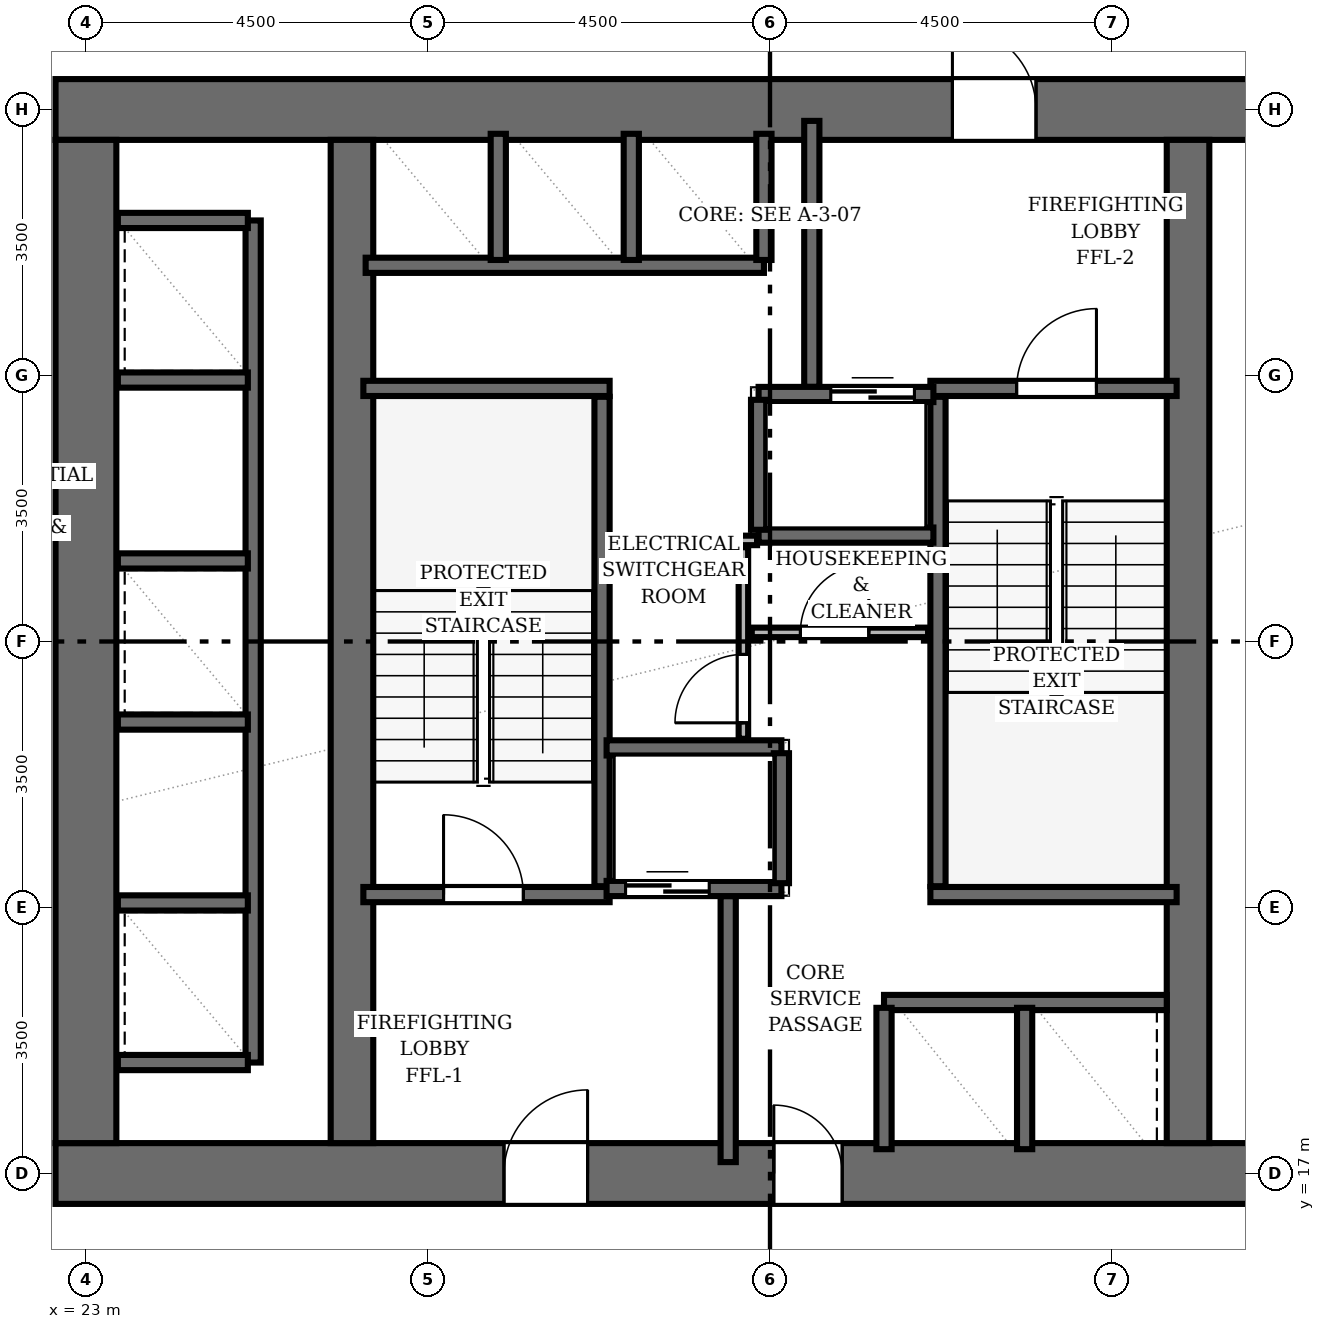
"""IFC4 building model, lengths in metres.
Left out: names, types, materials, properties, quantities, classifications, styles, units other than length and angle.
Written with IfcOpenShell. Run it as: python <this file> out.ifc"""

import sys

from ifc_helpers import new_model, si_unit, direction, frame, frame_2d, origin, place, context, subcontext, project, spatial, rectangle, extrude, element, fill, save


model = new_model("IFC4")
c1 = context("Model", 3, precision=1e-05, world=origin(), true_north=direction((0.0, 1.0)))
c2 = subcontext(c1, "Body", "Model", "MODEL_VIEW")
j1 = project(units=[si_unit("LENGTHUNIT", "METRE"), si_unit("PLANEANGLEUNIT", "RADIAN")], contexts=[c1])
p1 = place(None, origin())
s1 = spatial("IfcSite", under=j1, at=p1, CompositionType="ELEMENT")
p2 = place(p1, origin())
s2 = spatial("IfcBuilding", under=s1, at=p2, CompositionType="ELEMENT")
p3 = place(p2, frame((0.0, 0.0, 24.8)))
s3 = spatial("IfcBuildingStorey", under=s2, at=p3, CompositionType="ELEMENT", Elevation=24.8)
p4 = place(p3, frame((22.6, 17.0, 0.0), z_axis=(0.0, 0.0, 1.0), x_axis=(1.0, 0.0, 0.0)))
e1 = element("IfcWall", 1, at=p4, inside=s3, PredefinedType="SHEAR", context=c2, shape_type="SweptSolid", body=[
    extrude(rectangle(XDim=18.8, YDim=0.8, at=frame_2d((9.4, 0.0))), origin(), (0.0, 0.0, 1.0), 3.2),
])
p5 = place(p4, frame((5.9, 0.0, 0.0)))
e2 = element("IfcOpeningElement", 2, at=p5, cuts=e1, PredefinedType="OPENING", context=c2, shape_type="SweptSolid", body=[
    extrude(rectangle(XDim=1.1, YDim=2.15, at=frame_2d((0.55, 1.075))), frame((0.0, 0.41, 0.0), z_axis=(0.0, -1.0, 0.0), x_axis=(1.0, 0.0, 0.0)), (0.0, 0.0, 1.0), 0.82),
])
p6 = place(p4, frame((9.45, 0.0, 0.0)))
e3 = element("IfcOpeningElement", 3, at=p6, cuts=e1, PredefinedType="OPENING", context=c2, shape_type="SweptSolid", body=[
    extrude(rectangle(XDim=0.9, YDim=2.1, at=frame_2d((0.45, 1.05))), frame((0.0, 0.41, 0.0), z_axis=(0.0, -1.0, 0.0), x_axis=(1.0, 0.0, 0.0)), (0.0, 0.0, 1.0), 0.82),
])
p7 = place(p3, frame((22.6, 31.0, 0.0), z_axis=(0.0, 0.0, 1.0), x_axis=(1.0, 0.0, 0.0)))
e4 = element("IfcWall", 4, at=p7, inside=s3, PredefinedType="SHEAR", context=c2, shape_type="SweptSolid", body=[
    extrude(rectangle(XDim=18.8, YDim=0.8, at=frame_2d((9.4, 0.0))), origin(), (0.0, 0.0, 1.0), 3.2),
])
p8 = place(p7, frame((11.8, 0.0, 0.0)))
e5 = element("IfcOpeningElement", 5, at=p8, cuts=e4, PredefinedType="OPENING", context=c2, shape_type="SweptSolid", body=[
    extrude(rectangle(XDim=1.1, YDim=2.15, at=frame_2d((0.55, 1.075))), frame((0.0, 0.41, 0.0), z_axis=(0.0, -1.0, 0.0), x_axis=(1.0, 0.0, 0.0)), (0.0, 0.0, 1.0), 0.82),
])
p9 = place(p3, frame((23.0, 17.4, 0.0), z_axis=(0.0, 0.0, 1.0), x_axis=(0.0, 1.0, 0.0)))
e6 = element("IfcWall", 6, at=p9, inside=s3, PredefinedType="SHEAR", context=c2, shape_type="SweptSolid", body=[
    extrude(rectangle(XDim=13.2, YDim=0.8, at=frame_2d((6.6, 0.0))), origin(), (0.0, 0.0, 1.0), 3.2),
])
for number, where, z_axis, x_axis in (
    (7, (26.5, 17.4, 0.0), (0.0, 0.0, 1.0), (0.0, 1.0, 0.0)),
    (8, (37.5, 17.4, 0.0), (0.0, 0.0, 1.0), (0.0, 1.0, 0.0)),
):
    element("IfcWall", number, at=place(p3, frame(where, z_axis=z_axis, x_axis=x_axis)), inside=s3, PredefinedType="SHEAR", context=c2, shape_type="SweptSolid", body=[
        extrude(rectangle(XDim=13.2, YDim=0.56, at=frame_2d((6.6, 0.0))), origin(), (0.0, 0.0, 1.0), 3.2),
    ])
p10 = place(p3, frame((29.79, 20.78, 0.0), z_axis=(0.0, 0.0, 1.0), x_axis=(0.0, 1.0, 0.0)))
e9 = element("IfcWall", 9, at=p10, inside=s3, PredefinedType="SHEAR", context=c2, shape_type="SweptSolid", body=[
    extrude(rectangle(XDim=6.44, YDim=0.2, at=frame_2d((3.22, 0.0))), origin(), (0.0, 0.0, 1.0), 3.2),
])
p11 = place(p3, frame((26.65, 27.33, 0.0), z_axis=(0.0, 0.0, 1.0), x_axis=(1.0, 0.0, 0.0)))
e10 = element("IfcWall", 10, at=p11, inside=s3, PredefinedType="SHEAR", context=c2, shape_type="SweptSolid", body=[
    extrude(rectangle(XDim=3.24, YDim=0.2, at=frame_2d((1.62, 0.0))), origin(), (0.0, 0.0, 1.0), 3.2),
])
p12 = place(p3, frame((26.65, 20.67, 0.0), z_axis=(0.0, 0.0, 1.0), x_axis=(1.0, 0.0, 0.0)))
e11 = element("IfcWall", 11, at=p12, inside=s3, PredefinedType="SHEAR", context=c2, shape_type="SweptSolid", body=[
    extrude(rectangle(XDim=3.24, YDim=0.2, at=frame_2d((1.62, 0.0))), origin(), (0.0, 0.0, 1.0), 3.2),
])
p13 = place(p12, frame((1.055, 0.0, 0.0)))
e12 = element("IfcOpeningElement", 12, at=p13, cuts=e11, PredefinedType="OPENING", context=c2, shape_type="SweptSolid", body=[
    extrude(rectangle(XDim=1.05, YDim=2.15, at=frame_2d((0.525, 1.075))), frame((0.0, 0.11, 0.0), z_axis=(0.0, -1.0, 0.0), x_axis=(1.0, 0.0, 0.0)), (0.0, 0.0, 1.0), 0.22),
])
p14 = place(p3, frame((34.21, 20.78, 0.0), z_axis=(0.0, 0.0, 1.0), x_axis=(0.0, 1.0, 0.0)))
e13 = element("IfcWall", 13, at=p14, inside=s3, PredefinedType="SHEAR", context=c2, shape_type="SweptSolid", body=[
    extrude(rectangle(XDim=6.44, YDim=0.2, at=frame_2d((3.22, 0.0))), origin(), (0.0, 0.0, 1.0), 3.2),
])
p15 = place(p3, frame((34.11, 20.67, 0.0), z_axis=(0.0, 0.0, 1.0), x_axis=(1.0, 0.0, 0.0)))
e14 = element("IfcWall", 14, at=p15, inside=s3, PredefinedType="SHEAR", context=c2, shape_type="SweptSolid", body=[
    extrude(rectangle(XDim=3.24, YDim=0.2, at=frame_2d((1.62, 0.0))), origin(), (0.0, 0.0, 1.0), 3.2),
])
p16 = place(p3, frame((34.11, 27.33, 0.0), z_axis=(0.0, 0.0, 1.0), x_axis=(1.0, 0.0, 0.0)))
e15 = element("IfcWall", 15, at=p16, inside=s3, PredefinedType="SHEAR", context=c2, shape_type="SweptSolid", body=[
    extrude(rectangle(XDim=3.24, YDim=0.2, at=frame_2d((1.62, 0.0))), origin(), (0.0, 0.0, 1.0), 3.2),
])
p17 = place(p16, frame((1.135, 0.0, 0.0)))
e16 = element("IfcOpeningElement", 16, at=p17, cuts=e15, PredefinedType="OPENING", context=c2, shape_type="SweptSolid", body=[
    extrude(rectangle(XDim=1.05, YDim=2.15, at=frame_2d((0.525, 1.075))), frame((0.0, 0.11, 0.0), z_axis=(0.0, -1.0, 0.0), x_axis=(1.0, 0.0, 0.0)), (0.0, 0.0, 1.0), 0.22),
])
for number, where, z_axis, x_axis in (
    (17, (31.45, 17.15, 0.0), (0.0, 0.0, 1.0), (0.0, 1.0, 0.0)),
    (18, (32.55, 27.35, 0.0), (0.0, 0.0, 1.0), (0.0, 1.0, 0.0)),
):
    element("IfcWall", number, at=place(p3, frame(where, z_axis=z_axis, x_axis=x_axis)), inside=s3, PredefinedType="SHEAR", context=c2, shape_type="SweptSolid", body=[
        extrude(rectangle(XDim=3.5, YDim=0.2, at=frame_2d((1.75, 0.0))), origin(), (0.0, 0.0, 1.0), 3.2),
    ])
p18 = place(p3, frame((29.85, 20.75, 0.0), z_axis=(0.0, 0.0, 1.0), x_axis=(1.0, 0.0, 0.0)))
e19 = element("IfcWall", 19, at=p18, inside=s3, PredefinedType="SHEAR", context=c2, shape_type="SweptSolid", body=[
    extrude(rectangle(XDim=2.3, YDim=0.2, at=frame_2d((1.15, 0.0))), origin(), (0.0, 0.0, 1.0), 3.2),
])
p19 = place(p18, frame((0.25, 0.0, 0.0)))
e20 = element("IfcOpeningElement", 20, at=p19, cuts=e19, PredefinedType="OPENING", context=c2, shape_type="SweptSolid", body=[
    extrude(rectangle(XDim=1.1, YDim=2.15, at=frame_2d((0.55, 1.075))), frame((0.0, 0.11, 0.0), z_axis=(0.0, -1.0, 0.0), x_axis=(1.0, 0.0, 0.0)), (0.0, 0.0, 1.0), 0.22),
])
p20 = place(p3, frame((29.85, 22.6, 0.0), z_axis=(0.0, 0.0, 1.0), x_axis=(1.0, 0.0, 0.0)))
e21 = element("IfcWall", 21, at=p20, inside=s3, PredefinedType="SHEAR", context=c2, shape_type="SweptSolid", body=[
    extrude(rectangle(XDim=2.3, YDim=0.2, at=frame_2d((1.15, 0.0))), origin(), (0.0, 0.0, 1.0), 3.2),
])
p21 = place(p3, frame((32.15, 20.82, 0.0), z_axis=(0.0, 0.0, 1.0), x_axis=(0.0, 1.0, 0.0)))
e22 = element("IfcWall", 22, at=p21, inside=s3, PredefinedType="SHEAR", context=c2, shape_type="SweptSolid", body=[
    extrude(rectangle(XDim=1.71, YDim=0.2, at=frame_2d((0.855, 0.0))), origin(), (0.0, 0.0, 1.0), 3.2),
])
p22 = place(p3, frame((31.85, 27.25, 0.0), z_axis=(0.0, 0.0, 1.0), x_axis=(1.0, 0.0, 0.0)))
e23 = element("IfcWall", 23, at=p22, inside=s3, PredefinedType="SHEAR", context=c2, shape_type="SweptSolid", body=[
    extrude(rectangle(XDim=2.3, YDim=0.2, at=frame_2d((1.15, 0.0))), origin(), (0.0, 0.0, 1.0), 3.2),
])
p23 = place(p22, frame((0.95, 0.0, 0.0)))
e24 = element("IfcOpeningElement", 24, at=p23, cuts=e23, PredefinedType="OPENING", context=c2, shape_type="SweptSolid", body=[
    extrude(rectangle(XDim=1.1, YDim=2.15, at=frame_2d((0.55, 1.075))), frame((0.0, 0.11, 0.0), z_axis=(0.0, -1.0, 0.0), x_axis=(1.0, 0.0, 0.0)), (0.0, 0.0, 1.0), 0.22),
])
p24 = place(p3, frame((31.85, 25.4, 0.0), z_axis=(0.0, 0.0, 1.0), x_axis=(1.0, 0.0, 0.0)))
e25 = element("IfcWall", 25, at=p24, inside=s3, PredefinedType="SHEAR", context=c2, shape_type="SweptSolid", body=[
    extrude(rectangle(XDim=2.3, YDim=0.2, at=frame_2d((1.15, 0.0))), origin(), (0.0, 0.0, 1.0), 3.2),
])
p25 = place(p3, frame((31.85, 25.47, 0.0), z_axis=(0.0, 0.0, 1.0), x_axis=(0.0, 1.0, 0.0)))
e26 = element("IfcWall", 26, at=p25, inside=s3, PredefinedType="SHEAR", context=c2, shape_type="SweptSolid", body=[
    extrude(rectangle(XDim=1.71, YDim=0.2, at=frame_2d((0.855, 0.0))), origin(), (0.0, 0.0, 1.0), 3.2),
])
p26 = place(p3, frame((25.2, 18.46, 0.0), z_axis=(0.0, 0.0, 1.0), x_axis=(0.0, 1.0, 0.0)))
e27 = element("IfcWall", 27, at=p26, inside=s3, PredefinedType="SHEAR", context=c2, shape_type="SweptSolid", body=[
    extrude(rectangle(XDim=11.08, YDim=0.2, at=frame_2d((5.54, 0.0))), origin(), (0.0, 0.0, 1.0), 3.2),
])
for number, where, z_axis, x_axis in (
    (28, (23.42, 18.46, 0.0), (0.0, 0.0, 1.0), (1.0, 0.0, 0.0)),
    (29, (23.42, 29.54, 0.0), (0.0, 0.0, 1.0), (1.0, 0.0, 0.0)),
    (30, (23.42, 20.56, 0.0), (0.0, 0.0, 1.0), (1.0, 0.0, 0.0)),
    (31, (23.42, 22.94, 0.0), (0.0, 0.0, 1.0), (1.0, 0.0, 0.0)),
    (32, (23.42, 25.06, 0.0), (0.0, 0.0, 1.0), (1.0, 0.0, 0.0)),
    (33, (23.42, 27.44, 0.0), (0.0, 0.0, 1.0), (1.0, 0.0, 0.0)),
):
    element("IfcWall", number, at=place(p3, frame(where, z_axis=z_axis, x_axis=x_axis)), inside=s3, PredefinedType="SHEAR", context=c2, shape_type="SweptSolid", body=[
        extrude(rectangle(XDim=1.71, YDim=0.2, at=frame_2d((0.855, 0.0))), origin(), (0.0, 0.0, 1.0), 3.2),
    ])
p27 = place(p3, frame((26.68, 28.95, 0.0), z_axis=(0.0, 0.0, 1.0), x_axis=(1.0, 0.0, 0.0)))
e34 = element("IfcWall", 34, at=p27, inside=s3, PredefinedType="SHEAR", context=c2, shape_type="SweptSolid", body=[
    extrude(rectangle(XDim=5.24, YDim=0.2, at=frame_2d((2.62, 0.0))), origin(), (0.0, 0.0, 1.0), 3.2),
])
for number, where, z_axis, x_axis in (
    (35, (31.92, 29.02, 0.0), (0.0, 0.0, 1.0), (0.0, 1.0, 0.0)),
    (36, (28.425, 29.02, 0.0), (0.0, 0.0, 1.0), (0.0, 1.0, 0.0)),
    (37, (30.175, 29.02, 0.0), (0.0, 0.0, 1.0), (0.0, 1.0, 0.0)),
):
    element("IfcWall", number, at=place(p3, frame(where, z_axis=z_axis, x_axis=x_axis)), inside=s3, PredefinedType="SHEAR", context=c2, shape_type="SweptSolid", body=[
        extrude(rectangle(XDim=1.66, YDim=0.2, at=frame_2d((0.83, 0.0))), origin(), (0.0, 0.0, 1.0), 3.2),
    ])
p28 = place(p3, frame((33.5, 19.25, 0.0), z_axis=(0.0, 0.0, 1.0), x_axis=(1.0, 0.0, 0.0)))
e38 = element("IfcWall", 38, at=p28, inside=s3, PredefinedType="SHEAR", context=c2, shape_type="SweptSolid", body=[
    extrude(rectangle(XDim=3.72, YDim=0.2, at=frame_2d((1.86, 0.0))), origin(), (0.0, 0.0, 1.0), 3.2),
])
for number, where, z_axis, x_axis in (
    (39, (33.5, 17.32, 0.0), (0.0, 0.0, 1.0), (0.0, 1.0, 0.0)),
    (40, (35.35, 17.32, 0.0), (0.0, 0.0, 1.0), (0.0, 1.0, 0.0)),
):
    element("IfcWall", number, at=place(p3, frame(where, z_axis=z_axis, x_axis=x_axis)), inside=s3, PredefinedType="SHEAR", context=c2, shape_type="SweptSolid", body=[
        extrude(rectangle(XDim=1.86, YDim=0.2, at=frame_2d((0.93, 0.0))), origin(), (0.0, 0.0, 1.0), 3.2),
    ])
p29 = place(p3, frame((31.65, 22.72, 0.0), z_axis=(0.0, 0.0, 1.0), x_axis=(0.0, 1.0, 0.0)))
e41 = element("IfcWall", 41, at=p29, inside=s3, PredefinedType="PARTITIONING", context=c2, shape_type="SweptSolid", body=[
    extrude(rectangle(XDim=2.52, YDim=0.125, at=frame_2d((1.26, 0.0))), origin(), (0.0, 0.0, 1.0), 2.955),
])
p30 = place(p29, frame((0.21, 0.0, 0.0)))
e42 = element("IfcOpeningElement", 42, at=p30, cuts=e41, PredefinedType="OPENING", context=c2, shape_type="SweptSolid", body=[
    extrude(rectangle(XDim=0.9, YDim=2.1, at=frame_2d((0.45, 1.05))), frame((0.0, 0.073, 0.0), z_axis=(0.0, -1.0, 0.0), x_axis=(1.0, 0.0, 0.0)), (0.0, 0.0, 1.0), 0.145),
])
p31 = place(p3, frame((31.76, 24.12, 0.0), z_axis=(0.0, 0.0, 1.0), x_axis=(1.0, 0.0, 0.0)))
e43 = element("IfcWall", 43, at=p31, inside=s3, PredefinedType="PARTITIONING", context=c2, shape_type="SweptSolid", body=[
    extrude(rectangle(XDim=2.32, YDim=0.125, at=frame_2d((1.16, 0.0))), origin(), (0.0, 0.0, 1.0), 2.955),
])
p32 = place(p31, frame((0.64, 0.0, 0.0)))
e44 = element("IfcOpeningElement", 44, at=p32, cuts=e43, PredefinedType="OPENING", context=c2, shape_type="SweptSolid", body=[
    extrude(rectangle(XDim=0.9, YDim=2.1, at=frame_2d((0.45, 1.05))), frame((0.0, 0.073, 0.0), z_axis=(0.0, -1.0, 0.0), x_axis=(1.0, 0.0, 0.0)), (0.0, 0.0, 1.0), 0.145),
])
p33 = place(p3, frame((29.89, 25.33, 0.0), z_axis=(0.0, 0.0, 1.0), x_axis=(1.0, 0.0, 0.0)))
e45 = element("IfcWall", 45, at=p33, inside=s3, PredefinedType="PARTITIONING", context=c2, shape_type="SweptSolid", body=[
    extrude(rectangle(XDim=1.94, YDim=0.125, at=frame_2d((0.97, 0.0))), origin(), (0.0, 0.0, 1.0), 2.955),
])
p34 = place(p13, origin())
e46 = element("IfcDoor", 46, at=p34, inside=s3, OperationType="SINGLE_SWING_LEFT", PredefinedType="DOOR", context=c2, shape_type="SweptSolid", body=[
    extrude(rectangle(XDim=1.05, YDim=2.15, at=frame_2d((0.525, 1.075))), frame((0.0, 0.025, 0.0), z_axis=(0.0, -1.0, 0.0), x_axis=(1.0, 0.0, 0.0)), (0.0, 0.0, 1.0), 0.05),
])
fill(e12, e46)
p35 = place(p17, origin())
e47 = element("IfcDoor", 47, at=p35, inside=s3, OperationType="SINGLE_SWING_RIGHT", PredefinedType="DOOR", context=c2, shape_type="SweptSolid", body=[
    extrude(rectangle(XDim=1.05, YDim=2.15, at=frame_2d((0.525, 1.075))), frame((0.0, 0.025, 0.0), z_axis=(0.0, -1.0, 0.0), x_axis=(1.0, 0.0, 0.0)), (0.0, 0.0, 1.0), 0.05),
])
fill(e16, e47)
p36 = place(p5, origin())
e48 = element("IfcDoor", 48, at=p36, inside=s3, OperationType="SINGLE_SWING_RIGHT", PredefinedType="DOOR", context=c2, shape_type="SweptSolid", body=[
    extrude(rectangle(XDim=1.1, YDim=2.15, at=frame_2d((0.55, 1.075))), frame((0.0, 0.025, 0.0), z_axis=(0.0, -1.0, 0.0), x_axis=(1.0, 0.0, 0.0)), (0.0, 0.0, 1.0), 0.05),
])
fill(e2, e48)
p37 = place(p8, origin())
e49 = element("IfcDoor", 49, at=p37, inside=s3, OperationType="SINGLE_SWING_LEFT", PredefinedType="DOOR", context=c2, shape_type="SweptSolid", body=[
    extrude(rectangle(XDim=1.1, YDim=2.15, at=frame_2d((0.55, 1.075))), frame((0.0, 0.025, 0.0), z_axis=(0.0, -1.0, 0.0), x_axis=(1.0, 0.0, 0.0)), (0.0, 0.0, 1.0), 0.05),
])
fill(e5, e49)
p38 = place(p19, origin())
e50 = element("IfcDoor", 50, at=p38, inside=s3, OperationType="DOUBLE_DOOR_SLIDING", PredefinedType="DOOR", context=c2, shape_type="SweptSolid", body=[
    extrude(rectangle(XDim=1.1, YDim=2.15, at=frame_2d((0.55, 1.075))), frame((0.0, 0.025, 0.0), z_axis=(0.0, -1.0, 0.0), x_axis=(1.0, 0.0, 0.0)), (0.0, 0.0, 1.0), 0.05),
])
fill(e20, e50)
p39 = place(p23, origin())
e51 = element("IfcDoor", 51, at=p39, inside=s3, OperationType="DOUBLE_DOOR_SLIDING", PredefinedType="DOOR", context=c2, shape_type="SweptSolid", body=[
    extrude(rectangle(XDim=1.1, YDim=2.15, at=frame_2d((0.55, 1.075))), frame((0.0, 0.025, 0.0), z_axis=(0.0, -1.0, 0.0), x_axis=(1.0, 0.0, 0.0)), (0.0, 0.0, 1.0), 0.05),
])
fill(e24, e51)
p40 = place(p6, origin())
e52 = element("IfcDoor", 52, at=p40, inside=s3, OperationType="SINGLE_SWING_LEFT", PredefinedType="DOOR", context=c2, shape_type="SweptSolid", body=[
    extrude(rectangle(XDim=0.9, YDim=2.1, at=frame_2d((0.45, 1.05))), frame((0.0, 0.025, 0.0), z_axis=(0.0, -1.0, 0.0), x_axis=(1.0, 0.0, 0.0)), (0.0, 0.0, 1.0), 0.05),
])
fill(e3, e52)
p41 = place(p30, origin())
e53 = element("IfcDoor", 53, at=p41, inside=s3, OperationType="SINGLE_SWING_LEFT", PredefinedType="DOOR", context=c2, shape_type="SweptSolid", body=[
    extrude(rectangle(XDim=0.9, YDim=2.1, at=frame_2d((0.45, 1.05))), frame((0.0, 0.025, 0.0), z_axis=(0.0, -1.0, 0.0), x_axis=(1.0, 0.0, 0.0)), (0.0, 0.0, 1.0), 0.05),
])
fill(e42, e53)
p42 = place(p32, origin())
e54 = element("IfcDoor", 54, at=p42, inside=s3, OperationType="SINGLE_SWING_RIGHT", PredefinedType="DOOR", context=c2, shape_type="SweptSolid", body=[
    extrude(rectangle(XDim=0.9, YDim=2.1, at=frame_2d((0.45, 1.05))), frame((0.0, 0.025, 0.0), z_axis=(0.0, -1.0, 0.0), x_axis=(1.0, 0.0, 0.0)), (0.0, 0.0, 1.0), 0.05),
])
fill(e44, e54)
save(model, sys.argv[1])
